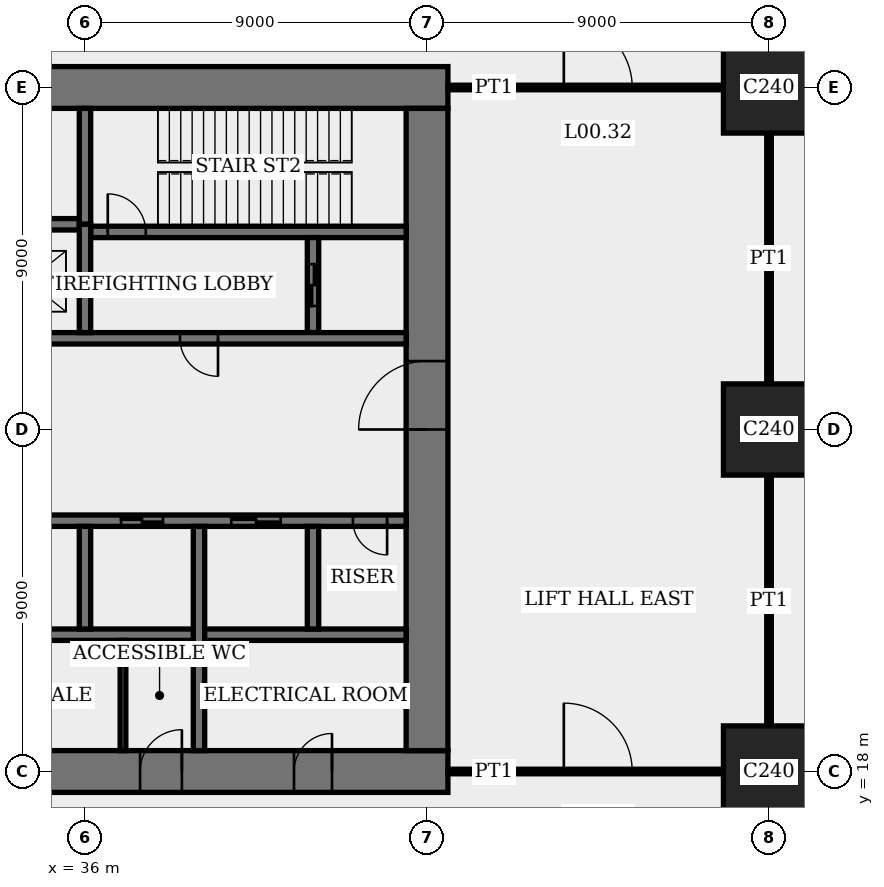
"""IFC4 building model, lengths in metres.
Left out: names, types, materials, properties, quantities, classifications, styles, units other than length and angle.
Written with IfcOpenShell. Run it as: python <this file> out.ifc"""

import sys

from ifc_helpers import new_model, si_unit, direction, frame, frame_2d, origin, origin_2d, place, context, subcontext, project, spatial, rectangle, extrude, element, fill, save


model = new_model("IFC4")
c1 = context("Model", 3, precision=1e-05, world=origin(), true_north=direction((0.0, 1.0)))
c2 = subcontext(c1, "Body", "Model", "MODEL_VIEW")
j1 = project(units=[si_unit("LENGTHUNIT", "METRE"), si_unit("PLANEANGLEUNIT", "RADIAN")], contexts=[c1])
p1 = place(None, origin())
s1 = spatial("IfcSite", under=j1, at=p1, CompositionType="ELEMENT")
p2 = place(p1, origin())
s2 = spatial("IfcBuilding", under=s1, at=p2, CompositionType="ELEMENT")
p3 = place(p2, origin())
s3 = spatial("IfcBuildingStorey", under=s2, at=p3, CompositionType="ELEMENT", Elevation=0.0)
for number, where, z_axis, x_axis in (
    (1, (54.0, 18.0, 0.0), (0.0, 0.0, 1.0), (1.0, 0.0, 0.0)),
    (2, (54.0, 27.0, 0.0), (0.0, 0.0, 1.0), (1.0, 0.0, 0.0)),
    (3, (54.0, 36.0, 0.0), (0.0, 0.0, 1.0), (1.0, 0.0, 0.0)),
):
    element("IfcColumn", number, at=place(p3, frame(where, z_axis=z_axis, x_axis=x_axis)), inside=s3, PredefinedType="COLUMN", context=c2, shape_type="SweptSolid", body=[
        extrude(rectangle(XDim=2.4, YDim=2.4, at=origin_2d()), origin(), (0.0, 0.0, 1.0), 5.4),
    ])
p4 = place(p3, frame((17.45, 18.0, 0.0), z_axis=(0.0, 0.0, 1.0), x_axis=(1.0, 0.0, 0.0)))
e4 = element("IfcWall", 4, at=p4, inside=s3, PredefinedType="SHEAR", context=c2, shape_type="SweptSolid", body=[
    extrude(rectangle(XDim=28.1, YDim=1.1, at=frame_2d((14.05, 0.0))), origin(), (0.0, 0.0, 1.0), 5.4),
])
p5 = place(p4, frame((11.55, 0.0, 0.0)))
e5 = element("IfcOpeningElement", 5, at=p5, cuts=e4, PredefinedType="OPENING", context=c2, shape_type="SweptSolid", body=[
    extrude(rectangle(XDim=1.0, YDim=2.4, at=frame_2d((0.5, 1.2))), frame((0.0, 0.56, 0.0), z_axis=(0.0, -1.0, 0.0), x_axis=(1.0, 0.0, 0.0)), (0.0, 0.0, 1.0), 1.12),
])
p6 = place(p4, frame((16.55, 0.0, 0.0)))
e6 = element("IfcOpeningElement", 6, at=p6, cuts=e4, PredefinedType="OPENING", context=c2, shape_type="SweptSolid", body=[
    extrude(rectangle(XDim=1.0, YDim=2.4, at=frame_2d((0.5, 1.2))), frame((0.0, 0.56, 0.0), z_axis=(0.0, -1.0, 0.0), x_axis=(1.0, 0.0, 0.0)), (0.0, 0.0, 1.0), 1.12),
])
p7 = place(p4, frame((20.0, 0.0, 0.0)))
e7 = element("IfcOpeningElement", 7, at=p7, cuts=e4, PredefinedType="OPENING", context=c2, shape_type="SweptSolid", body=[
    extrude(rectangle(XDim=1.1, YDim=2.4, at=frame_2d((0.55, 1.2))), frame((0.0, 0.56, 0.0), z_axis=(0.0, -1.0, 0.0), x_axis=(1.0, 0.0, 0.0)), (0.0, 0.0, 1.0), 1.12),
])
p8 = place(p4, frame((24.05, 0.0, 0.0)))
e8 = element("IfcOpeningElement", 8, at=p8, cuts=e4, PredefinedType="OPENING", context=c2, shape_type="SweptSolid", body=[
    extrude(rectangle(XDim=1.0, YDim=2.4, at=frame_2d((0.5, 1.2))), frame((0.0, 0.56, 0.0), z_axis=(0.0, -1.0, 0.0), x_axis=(1.0, 0.0, 0.0)), (0.0, 0.0, 1.0), 1.12),
])
p9 = place(p3, frame((45.55, 36.0, 0.0), z_axis=(0.0, 0.0, 1.0), x_axis=(-1.0, 0.0, 0.0)))
e9 = element("IfcWall", 9, at=p9, inside=s3, PredefinedType="SHEAR", context=c2, shape_type="SweptSolid", body=[
    extrude(rectangle(XDim=28.1, YDim=1.1, at=frame_2d((14.05, 0.0))), origin(), (0.0, 0.0, 1.0), 5.4),
])
p10 = place(p9, frame((11.55, 0.0, 0.0)))
e10 = element("IfcOpeningElement", 10, at=p10, cuts=e9, PredefinedType="OPENING", context=c2, shape_type="SweptSolid", body=[
    extrude(rectangle(XDim=1.0, YDim=2.4, at=frame_2d((0.5, 1.2))), frame((0.0, 0.56, 0.0), z_axis=(0.0, -1.0, 0.0), x_axis=(1.0, 0.0, 0.0)), (0.0, 0.0, 1.0), 1.12),
])
p11 = place(p9, frame((16.55, 0.0, 0.0)))
e11 = element("IfcOpeningElement", 11, at=p11, cuts=e9, PredefinedType="OPENING", context=c2, shape_type="SweptSolid", body=[
    extrude(rectangle(XDim=1.0, YDim=2.4, at=frame_2d((0.5, 1.2))), frame((0.0, 0.56, 0.0), z_axis=(0.0, -1.0, 0.0), x_axis=(1.0, 0.0, 0.0)), (0.0, 0.0, 1.0), 1.12),
])
p12 = place(p9, frame((20.0, 0.0, 0.0)))
e12 = element("IfcOpeningElement", 12, at=p12, cuts=e9, PredefinedType="OPENING", context=c2, shape_type="SweptSolid", body=[
    extrude(rectangle(XDim=1.1, YDim=2.4, at=frame_2d((0.55, 1.2))), frame((0.0, 0.56, 0.0), z_axis=(0.0, -1.0, 0.0), x_axis=(1.0, 0.0, 0.0)), (0.0, 0.0, 1.0), 1.12),
])
p13 = place(p9, frame((24.05, 0.0, 0.0)))
e13 = element("IfcOpeningElement", 13, at=p13, cuts=e9, PredefinedType="OPENING", context=c2, shape_type="SweptSolid", body=[
    extrude(rectangle(XDim=1.0, YDim=2.4, at=frame_2d((0.5, 1.2))), frame((0.0, 0.56, 0.0), z_axis=(0.0, -1.0, 0.0), x_axis=(1.0, 0.0, 0.0)), (0.0, 0.0, 1.0), 1.12),
])
p14 = place(p3, frame((45.0, 18.55, 0.0), z_axis=(0.0, 0.0, 1.0), x_axis=(0.0, 1.0, 0.0)))
e14 = element("IfcWall", 14, at=p14, inside=s3, PredefinedType="SHEAR", context=c2, shape_type="SweptSolid", body=[
    extrude(rectangle(XDim=16.9, YDim=1.1, at=frame_2d((8.45, 0.0))), origin(), (0.0, 0.0, 1.0), 5.4),
])
p15 = place(p14, frame((8.45, 0.0, 0.0)))
e15 = element("IfcOpeningElement", 15, at=p15, cuts=e14, PredefinedType="OPENING", context=c2, shape_type="SweptSolid", body=[
    extrude(rectangle(XDim=1.8, YDim=2.4, at=frame_2d((0.9, 1.2))), frame((0.0, 0.56, 0.0), z_axis=(0.0, -1.0, 0.0), x_axis=(1.0, 0.0, 0.0)), (0.0, 0.0, 1.0), 1.12),
])
p16 = place(p3, frame((36.15, 32.2, 0.0), z_axis=(0.0, 0.0, 1.0), x_axis=(1.0, 0.0, 0.0)))
e16 = element("IfcWall", 16, at=p16, inside=s3, PredefinedType="SHEAR", context=c2, shape_type="SweptSolid", body=[
    extrude(rectangle(XDim=8.3, YDim=0.3, at=frame_2d((4.15, 0.0))), origin(), (0.0, 0.0, 1.0), 5.4),
])
p17 = place(p16, frame((0.45, 0.0, 0.0)))
e17 = element("IfcOpeningElement", 17, at=p17, cuts=e16, PredefinedType="OPENING", context=c2, shape_type="SweptSolid", body=[
    extrude(rectangle(XDim=1.0, YDim=2.4, at=frame_2d((0.5, 1.2))), frame((0.0, 0.16, 0.0), z_axis=(0.0, -1.0, 0.0), x_axis=(1.0, 0.0, 0.0)), (0.0, 0.0, 1.0), 0.32),
])
p18 = place(p3, frame((36.0, 32.4, 0.0), z_axis=(0.0, 0.0, 1.0), x_axis=(0.0, 1.0, 0.0)))
e18 = element("IfcWall", 18, at=p18, inside=s3, PredefinedType="SHEAR", context=c2, shape_type="SweptSolid", body=[
    extrude(rectangle(XDim=3.05, YDim=0.3, at=frame_2d((1.525, 0.0))), origin(), (0.0, 0.0, 1.0), 5.4),
])
p19 = place(p3, frame((42.0, 29.55, 0.0), z_axis=(0.0, 0.0, 1.0), x_axis=(0.0, 1.0, 0.0)))
e19 = element("IfcWall", 19, at=p19, inside=s3, PredefinedType="SHEAR", context=c2, shape_type="SweptSolid", body=[
    extrude(rectangle(XDim=2.5, YDim=0.3, at=frame_2d((1.25, 0.0))), origin(), (0.0, 0.0, 1.0), 5.4),
])
p20 = place(p19, frame((0.7, 0.0, 0.0)))
e20 = element("IfcOpeningElement", 20, at=p20, cuts=e19, PredefinedType="OPENING", context=c2, shape_type="SweptSolid", body=[
    extrude(rectangle(XDim=1.1, YDim=2.4, at=frame_2d((0.55, 1.2))), frame((0.0, 0.16, 0.0), z_axis=(0.0, -1.0, 0.0), x_axis=(1.0, 0.0, 0.0)), (0.0, 0.0, 1.0), 0.32),
])
p21 = place(p3, frame((18.55, 24.6, 0.0), z_axis=(0.0, 0.0, 1.0), x_axis=(1.0, 0.0, 0.0)))
e21 = element("IfcWall", 21, at=p21, inside=s3, PredefinedType="SHEAR", context=c2, shape_type="SweptSolid", body=[
    extrude(rectangle(XDim=25.9, YDim=0.3, at=frame_2d((12.95, 0.0))), origin(), (0.0, 0.0, 1.0), 5.4),
])
p22 = place(p21, frame((4.95, 0.0, 0.0)))
e22 = element("IfcOpeningElement", 22, at=p22, cuts=e21, PredefinedType="OPENING", context=c2, shape_type="SweptSolid", body=[
    extrude(rectangle(XDim=1.0, YDim=2.4, at=frame_2d((0.5, 1.2))), frame((0.0, 0.16, 0.0), z_axis=(0.0, -1.0, 0.0), x_axis=(1.0, 0.0, 0.0)), (0.0, 0.0, 1.0), 0.32),
])
p23 = place(p21, frame((24.5, 0.0, 0.0)))
e23 = element("IfcOpeningElement", 23, at=p23, cuts=e21, PredefinedType="OPENING", context=c2, shape_type="SweptSolid", body=[
    extrude(rectangle(XDim=0.9, YDim=2.1, at=frame_2d((0.45, 1.05))), frame((0.0, 0.16, 0.0), z_axis=(0.0, -1.0, 0.0), x_axis=(1.0, 0.0, 0.0)), (0.0, 0.0, 1.0), 0.32),
])
p24 = place(p21, frame((9.4, 0.0, 0.0)))
e24 = element("IfcOpeningElement", 24, at=p24, cuts=e21, PredefinedType="OPENING", context=c2, shape_type="SweptSolid", body=[
    extrude(rectangle(XDim=1.1, YDim=2.4, at=frame_2d((0.55, 1.2))), frame((0.0, 0.16, 0.0), z_axis=(0.0, -1.0, 0.0), x_axis=(1.0, 0.0, 0.0)), (0.0, 0.0, 1.0), 0.32),
])
p25 = place(p21, frame((12.4, 0.0, 0.0)))
e25 = element("IfcOpeningElement", 25, at=p25, cuts=e21, PredefinedType="OPENING", context=c2, shape_type="SweptSolid", body=[
    extrude(rectangle(XDim=1.1, YDim=2.4, at=frame_2d((0.55, 1.2))), frame((0.0, 0.16, 0.0), z_axis=(0.0, -1.0, 0.0), x_axis=(1.0, 0.0, 0.0)), (0.0, 0.0, 1.0), 0.32),
])
p26 = place(p21, frame((15.4, 0.0, 0.0)))
e26 = element("IfcOpeningElement", 26, at=p26, cuts=e21, PredefinedType="OPENING", context=c2, shape_type="SweptSolid", body=[
    extrude(rectangle(XDim=1.1, YDim=2.4, at=frame_2d((0.55, 1.2))), frame((0.0, 0.16, 0.0), z_axis=(0.0, -1.0, 0.0), x_axis=(1.0, 0.0, 0.0)), (0.0, 0.0, 1.0), 0.32),
])
p27 = place(p21, frame((18.4, 0.0, 0.0)))
e27 = element("IfcOpeningElement", 27, at=p27, cuts=e21, PredefinedType="OPENING", context=c2, shape_type="SweptSolid", body=[
    extrude(rectangle(XDim=1.1, YDim=2.4, at=frame_2d((0.55, 1.2))), frame((0.0, 0.16, 0.0), z_axis=(0.0, -1.0, 0.0), x_axis=(1.0, 0.0, 0.0)), (0.0, 0.0, 1.0), 0.32),
])
p28 = place(p21, frame((21.3, 0.0, 0.0)))
e28 = element("IfcOpeningElement", 28, at=p28, cuts=e21, PredefinedType="OPENING", context=c2, shape_type="SweptSolid", body=[
    extrude(rectangle(XDim=1.3, YDim=2.4, at=frame_2d((0.65, 1.2))), frame((0.0, 0.16, 0.0), z_axis=(0.0, -1.0, 0.0), x_axis=(1.0, 0.0, 0.0)), (0.0, 0.0, 1.0), 0.32),
])
p29 = place(p3, frame((18.55, 29.4, 0.0), z_axis=(0.0, 0.0, 1.0), x_axis=(1.0, 0.0, 0.0)))
e29 = element("IfcWall", 29, at=p29, inside=s3, PredefinedType="SHEAR", context=c2, shape_type="SweptSolid", body=[
    extrude(rectangle(XDim=25.9, YDim=0.3, at=frame_2d((12.95, 0.0))), origin(), (0.0, 0.0, 1.0), 5.4),
])
p30 = place(p29, frame((19.95, 0.0, 0.0)))
e30 = element("IfcOpeningElement", 30, at=p30, cuts=e29, PredefinedType="OPENING", context=c2, shape_type="SweptSolid", body=[
    extrude(rectangle(XDim=1.0, YDim=2.4, at=frame_2d((0.5, 1.2))), frame((0.0, 0.16, 0.0), z_axis=(0.0, -1.0, 0.0), x_axis=(1.0, 0.0, 0.0)), (0.0, 0.0, 1.0), 0.32),
])
p31 = place(p29, frame((0.5, 0.0, 0.0)))
e31 = element("IfcOpeningElement", 31, at=p31, cuts=e29, PredefinedType="OPENING", context=c2, shape_type="SweptSolid", body=[
    extrude(rectangle(XDim=0.9, YDim=2.1, at=frame_2d((0.45, 1.05))), frame((0.0, 0.16, 0.0), z_axis=(0.0, -1.0, 0.0), x_axis=(1.0, 0.0, 0.0)), (0.0, 0.0, 1.0), 0.32),
])
p32 = place(p29, frame((15.4, 0.0, 0.0)))
e32 = element("IfcOpeningElement", 32, at=p32, cuts=e29, PredefinedType="OPENING", context=c2, shape_type="SweptSolid", body=[
    extrude(rectangle(XDim=1.1, YDim=2.4, at=frame_2d((0.55, 1.2))), frame((0.0, 0.16, 0.0), z_axis=(0.0, -1.0, 0.0), x_axis=(1.0, 0.0, 0.0)), (0.0, 0.0, 1.0), 0.32),
])
p33 = place(p29, frame((12.4, 0.0, 0.0)))
e33 = element("IfcOpeningElement", 33, at=p33, cuts=e29, PredefinedType="OPENING", context=c2, shape_type="SweptSolid", body=[
    extrude(rectangle(XDim=1.1, YDim=2.4, at=frame_2d((0.55, 1.2))), frame((0.0, 0.16, 0.0), z_axis=(0.0, -1.0, 0.0), x_axis=(1.0, 0.0, 0.0)), (0.0, 0.0, 1.0), 0.32),
])
p34 = place(p29, frame((9.4, 0.0, 0.0)))
e34 = element("IfcOpeningElement", 34, at=p34, cuts=e29, PredefinedType="OPENING", context=c2, shape_type="SweptSolid", body=[
    extrude(rectangle(XDim=1.1, YDim=2.4, at=frame_2d((0.55, 1.2))), frame((0.0, 0.16, 0.0), z_axis=(0.0, -1.0, 0.0), x_axis=(1.0, 0.0, 0.0)), (0.0, 0.0, 1.0), 0.32),
])
p35 = place(p29, frame((6.4, 0.0, 0.0)))
e35 = element("IfcOpeningElement", 35, at=p35, cuts=e29, PredefinedType="OPENING", context=c2, shape_type="SweptSolid", body=[
    extrude(rectangle(XDim=1.1, YDim=2.4, at=frame_2d((0.55, 1.2))), frame((0.0, 0.16, 0.0), z_axis=(0.0, -1.0, 0.0), x_axis=(1.0, 0.0, 0.0)), (0.0, 0.0, 1.0), 0.32),
])
p36 = place(p29, frame((3.3, 0.0, 0.0)))
e36 = element("IfcOpeningElement", 36, at=p36, cuts=e29, PredefinedType="OPENING", context=c2, shape_type="SweptSolid", body=[
    extrude(rectangle(XDim=1.3, YDim=2.4, at=frame_2d((0.65, 1.2))), frame((0.0, 0.16, 0.0), z_axis=(0.0, -1.0, 0.0), x_axis=(1.0, 0.0, 0.0)), (0.0, 0.0, 1.0), 0.32),
])
for number, where, z_axis, x_axis in (
    (37, (27.15, 21.6, 0.0), (0.0, 0.0, 1.0), (1.0, 0.0, 0.0)),
    (38, (18.55, 32.4, 0.0), (0.0, 0.0, 1.0), (1.0, 0.0, 0.0)),
):
    element("IfcWall", number, at=place(p3, frame(where, z_axis=z_axis, x_axis=x_axis)), inside=s3, PredefinedType="SHEAR", context=c2, shape_type="SweptSolid", body=[
        extrude(rectangle(XDim=17.3, YDim=0.3, at=frame_2d((8.65, 0.0))), origin(), (0.0, 0.0, 1.0), 5.4),
    ])
p37 = place(p3, frame((36.0, 21.75, 0.0), z_axis=(0.0, 0.0, 1.0), x_axis=(0.0, 1.0, 0.0)))
e39 = element("IfcWall", 39, at=p37, inside=s3, PredefinedType="SHEAR", context=c2, shape_type="SweptSolid", body=[
    extrude(rectangle(XDim=2.7, YDim=0.3, at=frame_2d((1.35, 0.0))), origin(), (0.0, 0.0, 1.0), 5.4),
])
p38 = place(p3, frame((39.0, 18.55, 0.0), z_axis=(0.0, 0.0, 1.0), x_axis=(0.0, 1.0, 0.0)))
e40 = element("IfcWall", 40, at=p38, inside=s3, PredefinedType="SHEAR", context=c2, shape_type="SweptSolid", body=[
    extrude(rectangle(XDim=5.9, YDim=0.3, at=frame_2d((2.95, 0.0))), origin(), (0.0, 0.0, 1.0), 5.4),
])
p39 = place(p3, frame((42.0, 21.75, 0.0), z_axis=(0.0, 0.0, 1.0), x_axis=(0.0, 1.0, 0.0)))
e41 = element("IfcWall", 41, at=p39, inside=s3, PredefinedType="SHEAR", context=c2, shape_type="SweptSolid", body=[
    extrude(rectangle(XDim=2.7, YDim=0.3, at=frame_2d((1.35, 0.0))), origin(), (0.0, 0.0, 1.0), 5.4),
])
p40 = place(p3, frame((36.0, 29.55, 0.0), z_axis=(0.0, 0.0, 1.0), x_axis=(0.0, 1.0, 0.0)))
e42 = element("IfcWall", 42, at=p40, inside=s3, PredefinedType="SHEAR", context=c2, shape_type="SweptSolid", body=[
    extrude(rectangle(XDim=2.85, YDim=0.3, at=frame_2d((1.425, 0.0))), origin(), (0.0, 0.0, 1.0), 5.4),
])
p41 = place(p3, frame((45.55, 18.0, 0.0), z_axis=(0.0, 0.0, 1.0), x_axis=(1.0, 0.0, 0.0)))
e43 = element("IfcWall", 43, at=p41, inside=s3, PredefinedType="PARTITIONING", context=c2, shape_type="SweptSolid", body=[
    extrude(rectangle(XDim=7.25, YDim=0.12, at=frame_2d((3.625, 0.0))), origin(), (0.0, 0.0, 1.0), 4.3),
])
p42 = place(p41, frame((3.05, 0.0, 0.0)))
e44 = element("IfcOpeningElement", 44, at=p42, cuts=e43, PredefinedType="OPENING", context=c2, shape_type="SweptSolid", body=[
    extrude(rectangle(XDim=1.8, YDim=2.7, at=frame_2d((0.9, 1.35))), frame((0.0, 0.07, 0.0), z_axis=(0.0, -1.0, 0.0), x_axis=(1.0, 0.0, 0.0)), (0.0, 0.0, 1.0), 0.14),
])
p43 = place(p3, frame((45.55, 36.0, 0.0), z_axis=(0.0, 0.0, 1.0), x_axis=(1.0, 0.0, 0.0)))
e45 = element("IfcWall", 45, at=p43, inside=s3, PredefinedType="PARTITIONING", context=c2, shape_type="SweptSolid", body=[
    extrude(rectangle(XDim=7.25, YDim=0.12, at=frame_2d((3.625, 0.0))), origin(), (0.0, 0.0, 1.0), 4.3),
])
p44 = place(p43, frame((3.05, 0.0, 0.0)))
e46 = element("IfcOpeningElement", 46, at=p44, cuts=e45, PredefinedType="OPENING", context=c2, shape_type="SweptSolid", body=[
    extrude(rectangle(XDim=1.8, YDim=2.7, at=frame_2d((0.9, 1.35))), frame((0.0, 0.07, 0.0), z_axis=(0.0, -1.0, 0.0), x_axis=(1.0, 0.0, 0.0)), (0.0, 0.0, 1.0), 0.14),
])
for number, where, z_axis, x_axis in (
    (47, (54.0, 19.2, 0.0), (0.0, 0.0, 1.0), (0.0, 1.0, 0.0)),
    (48, (54.0, 28.2, 0.0), (0.0, 0.0, 1.0), (0.0, 1.0, 0.0)),
):
    element("IfcWall", number, at=place(p3, frame(where, z_axis=z_axis, x_axis=x_axis)), inside=s3, PredefinedType="PARTITIONING", context=c2, shape_type="SweptSolid", body=[
        extrude(rectangle(XDim=6.6, YDim=0.12, at=frame_2d((3.3, 0.0))), origin(), (0.0, 0.0, 1.0), 4.3),
    ])
p45 = place(p3, frame((37.0, 18.55, 0.0), z_axis=(0.0, 0.0, 1.0), x_axis=(0.0, 1.0, 0.0)))
e49 = element("IfcWall", 49, at=p45, inside=s3, PredefinedType="PARTITIONING", context=c2, shape_type="SweptSolid", body=[
    extrude(rectangle(XDim=2.9, YDim=0.15, at=frame_2d((1.45, 0.0))), origin(), (0.0, 0.0, 1.0), 5.1),
])
p46 = place(p15, origin())
e50 = element("IfcDoor", 50, at=p46, inside=s3, OperationType="DOUBLE_DOOR_DOUBLE_SWING", PredefinedType="DOOR", context=c2, shape_type="SweptSolid", body=[
    extrude(rectangle(XDim=1.8, YDim=2.4, at=frame_2d((0.9, 1.2))), frame((0.0, 0.03, 0.0), z_axis=(0.0, -1.0, 0.0), x_axis=(1.0, 0.0, 0.0)), (0.0, 0.0, 1.0), 0.06),
    extrude(rectangle(XDim=0.04, YDim=2.4, at=frame_2d((0.02, 1.2))), frame((0.0, 0.55, 0.0), z_axis=(0.0, -1.0, 0.0), x_axis=(1.0, 0.0, 0.0)), (0.0, 0.0, 1.0), 1.1),
    extrude(rectangle(XDim=0.04, YDim=2.4, at=frame_2d((1.78, 1.2))), frame((0.0, 0.55, 0.0), z_axis=(0.0, -1.0, 0.0), x_axis=(1.0, 0.0, 0.0)), (0.0, 0.0, 1.0), 1.1),
    extrude(rectangle(XDim=1.8, YDim=0.04, at=frame_2d((0.9, 2.38))), frame((0.0, 0.55, 0.0), z_axis=(0.0, -1.0, 0.0), x_axis=(1.0, 0.0, 0.0)), (0.0, 0.0, 1.0), 1.1),
])
fill(e15, e50)
p47 = place(p7, origin())
e51 = element("IfcDoor", 51, at=p47, inside=s3, OperationType="SINGLE_SWING_LEFT", PredefinedType="DOOR", context=c2, shape_type="SweptSolid", body=[
    extrude(rectangle(XDim=1.1, YDim=2.4, at=frame_2d((0.55, 1.2))), frame((0.0, 0.025, 0.0), z_axis=(0.0, -1.0, 0.0), x_axis=(1.0, 0.0, 0.0)), (0.0, 0.0, 1.0), 0.05),
    extrude(rectangle(XDim=0.04, YDim=2.4, at=frame_2d((0.02, 1.2))), frame((0.0, 0.44, 0.0), z_axis=(0.0, -1.0, 0.0), x_axis=(1.0, 0.0, 0.0)), (0.0, 0.0, 1.0), 0.88),
    extrude(rectangle(XDim=0.04, YDim=2.4, at=frame_2d((1.08, 1.2))), frame((0.0, 0.44, 0.0), z_axis=(0.0, -1.0, 0.0), x_axis=(1.0, 0.0, 0.0)), (0.0, 0.0, 1.0), 0.88),
    extrude(rectangle(XDim=1.1, YDim=0.04, at=frame_2d((0.55, 2.38))), frame((0.0, 0.44, 0.0), z_axis=(0.0, -1.0, 0.0), x_axis=(1.0, 0.0, 0.0)), (0.0, 0.0, 1.0), 0.88),
])
fill(e7, e51)
p48 = place(p8, origin())
e52 = element("IfcDoor", 52, at=p48, inside=s3, OperationType="SINGLE_SWING_LEFT", PredefinedType="DOOR", context=c2, shape_type="SweptSolid", body=[
    extrude(rectangle(XDim=1.0, YDim=2.4, at=frame_2d((0.5, 1.2))), frame((0.0, 0.025, 0.0), z_axis=(0.0, -1.0, 0.0), x_axis=(1.0, 0.0, 0.0)), (0.0, 0.0, 1.0), 0.05),
    extrude(rectangle(XDim=0.04, YDim=2.4, at=frame_2d((0.02, 1.2))), frame((0.0, 0.4, 0.0), z_axis=(0.0, -1.0, 0.0), x_axis=(1.0, 0.0, 0.0)), (0.0, 0.0, 1.0), 0.8),
    extrude(rectangle(XDim=0.04, YDim=2.4, at=frame_2d((0.98, 1.2))), frame((0.0, 0.4, 0.0), z_axis=(0.0, -1.0, 0.0), x_axis=(1.0, 0.0, 0.0)), (0.0, 0.0, 1.0), 0.8),
    extrude(rectangle(XDim=1.0, YDim=0.04, at=frame_2d((0.5, 2.38))), frame((0.0, 0.4, 0.0), z_axis=(0.0, -1.0, 0.0), x_axis=(1.0, 0.0, 0.0)), (0.0, 0.0, 1.0), 0.8),
])
fill(e8, e52)
p49 = place(p17, origin())
e53 = element("IfcDoor", 53, at=p49, inside=s3, OperationType="SINGLE_SWING_RIGHT", PredefinedType="DOOR", context=c2, shape_type="SweptSolid", body=[
    extrude(rectangle(XDim=1.0, YDim=2.4, at=frame_2d((0.5, 1.2))), frame((0.0, 0.03, 0.0), z_axis=(0.0, -1.0, 0.0), x_axis=(1.0, 0.0, 0.0)), (0.0, 0.0, 1.0), 0.06),
])
fill(e17, e53)
p50 = place(p30, origin())
e54 = element("IfcDoor", 54, at=p50, inside=s3, OperationType="SINGLE_SWING_RIGHT", PredefinedType="DOOR", context=c2, shape_type="SweptSolid", body=[
    extrude(rectangle(XDim=1.0, YDim=2.4, at=frame_2d((0.5, 1.2))), frame((0.0, 0.03, 0.0), z_axis=(0.0, -1.0, 0.0), x_axis=(1.0, 0.0, 0.0)), (0.0, 0.0, 1.0), 0.06),
])
fill(e30, e54)
p51 = place(p23, origin())
e55 = element("IfcDoor", 55, at=p51, inside=s3, OperationType="SINGLE_SWING_RIGHT", PredefinedType="DOOR", context=c2, shape_type="SweptSolid", body=[
    extrude(rectangle(XDim=0.9, YDim=2.1, at=frame_2d((0.45, 1.05))), frame((0.0, 0.03, 0.0), z_axis=(0.0, -1.0, 0.0), x_axis=(1.0, 0.0, 0.0)), (0.0, 0.0, 1.0), 0.06),
])
fill(e23, e55)
p52 = place(p42, origin())
e56 = element("IfcDoor", 56, at=p52, inside=s3, OperationType="DOUBLE_DOOR_DOUBLE_SWING", PredefinedType="DOOR", context=c2, shape_type="SweptSolid", body=[
    extrude(rectangle(XDim=1.8, YDim=2.7, at=frame_2d((0.9, 1.35))), frame((0.0, 0.025, 0.0), z_axis=(0.0, -1.0, 0.0), x_axis=(1.0, 0.0, 0.0)), (0.0, 0.0, 1.0), 0.05),
])
fill(e44, e56)
p53 = place(p44, origin())
e57 = element("IfcDoor", 57, at=p53, inside=s3, OperationType="DOUBLE_DOOR_DOUBLE_SWING", PredefinedType="DOOR", context=c2, shape_type="SweptSolid", body=[
    extrude(rectangle(XDim=1.8, YDim=2.7, at=frame_2d((0.9, 1.35))), frame((0.0, 0.025, 0.0), z_axis=(0.0, -1.0, 0.0), x_axis=(1.0, 0.0, 0.0)), (0.0, 0.0, 1.0), 0.05),
])
fill(e46, e57)
p54 = place(p27, origin())
e58 = element("IfcDoor", 58, at=p54, inside=s3, OperationType="DOUBLE_DOOR_SLIDING", PredefinedType="DOOR", context=c2, shape_type="SweptSolid", body=[
    extrude(rectangle(XDim=1.1, YDim=2.4, at=frame_2d((0.55, 1.2))), frame((0.0, 0.02, 0.0), z_axis=(0.0, -1.0, 0.0), x_axis=(1.0, 0.0, 0.0)), (0.0, 0.0, 1.0), 0.04),
])
fill(e27, e58)
p55 = place(p28, origin())
e59 = element("IfcDoor", 59, at=p55, inside=s3, OperationType="DOUBLE_DOOR_SLIDING", PredefinedType="DOOR", context=c2, shape_type="SweptSolid", body=[
    extrude(rectangle(XDim=1.3, YDim=2.4, at=frame_2d((0.65, 1.2))), frame((0.0, 0.02, 0.0), z_axis=(0.0, -1.0, 0.0), x_axis=(1.0, 0.0, 0.0)), (0.0, 0.0, 1.0), 0.04),
])
fill(e28, e59)
p56 = place(p20, origin())
e60 = element("IfcDoor", 60, at=p56, inside=s3, OperationType="DOUBLE_DOOR_SLIDING", PredefinedType="DOOR", context=c2, shape_type="SweptSolid", body=[
    extrude(rectangle(XDim=1.1, YDim=2.4, at=frame_2d((0.55, 1.2))), frame((0.0, 0.03, 0.0), z_axis=(0.0, -1.0, 0.0), x_axis=(1.0, 0.0, 0.0)), (0.0, 0.0, 1.0), 0.06),
])
fill(e20, e60)
save(model, sys.argv[1])
